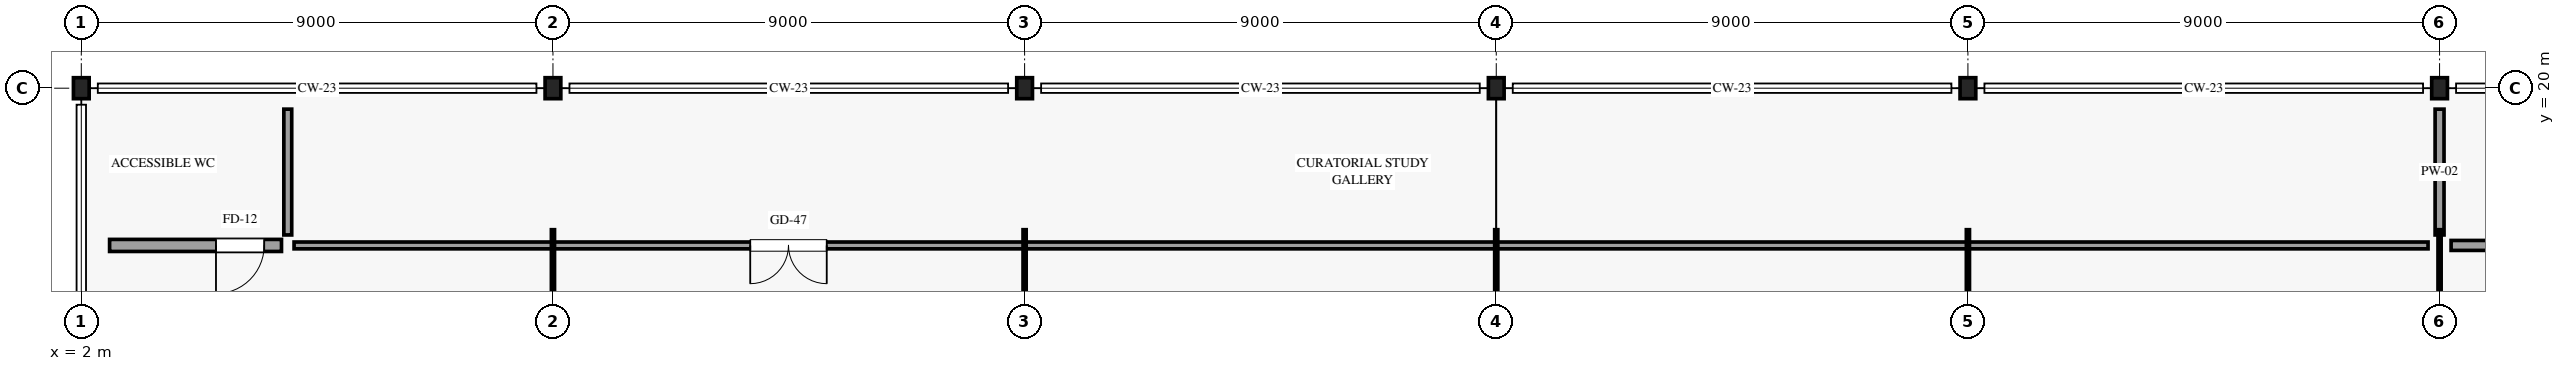
"""IFC4 building model, lengths in metres.
Left out: names, types, materials, properties, quantities, classifications, styles, units other than length and angle.
Written with IfcOpenShell. Run it as: python <this file> out.ifc"""

import sys

from ifc_helpers import new_model, si_unit, direction, frame, frame_2d, origin, origin_2d, place, context, subcontext, project, spatial, rectangle, i_section, extrude, element, fill, save


model = new_model("IFC4")
c1 = context("Model", 3, precision=1e-05, world=origin(), true_north=direction((0.0, 1.0)))
c2 = subcontext(c1, "Body", "Model", "MODEL_VIEW")
j1 = project(units=[si_unit("LENGTHUNIT", "METRE"), si_unit("PLANEANGLEUNIT", "RADIAN")], contexts=[c1])
p1 = place(None, origin())
s1 = spatial("IfcSite", under=j1, at=p1, CompositionType="ELEMENT")
p2 = place(p1, origin())
s2 = spatial("IfcBuilding", under=s1, at=p2, CompositionType="ELEMENT")
p3 = place(p2, frame((0.0, 0.0, 24.0)))
s3 = spatial("IfcBuildingStorey", under=s2, at=p3, CompositionType="ELEMENT", Elevation=24.0)
for number, where, z_axis, x_axis in (
    (1, (2.0, 20.0, 0.0), (0.0, 0.0, 1.0), (1.0, 0.0, 0.0)),
    (2, (11.0, 20.0, 0.0), (0.0, 0.0, 1.0), (1.0, 0.0, 0.0)),
    (3, (20.0, 20.0, 0.0), (0.0, 0.0, 1.0), (1.0, 0.0, 0.0)),
    (4, (29.0, 20.0, 0.0), (0.0, 0.0, 1.0), (1.0, 0.0, 0.0)),
    (5, (38.0, 20.0, 0.0), (0.0, 0.0, 1.0), (1.0, 0.0, 0.0)),
    (6, (47.0, 20.0, 0.0), (0.0, 0.0, 1.0), (1.0, 0.0, 0.0)),
):
    element("IfcColumn", number, at=place(p3, frame(where, z_axis=z_axis, x_axis=x_axis)), inside=s3, PredefinedType="COLUMN", context=c2, shape_type="SweptSolid", body=[
        extrude(i_section(OverallWidth=0.3, OverallDepth=0.4, WebThickness=0.013, FlangeThickness=0.024, FilletRadius=0.027, at=origin_2d()), origin(), (0.0, 0.0, 1.0), 4.8),
    ])
p4 = place(p3, frame((2.54, 17.0, 0.0), z_axis=(0.0, 0.0, 1.0), x_axis=(1.0, 0.0, 0.0)))
e7 = element("IfcWall", 7, at=p4, inside=s3, PredefinedType="PARTITIONING", context=c2, shape_type="SweptSolid", body=[
    extrude(rectangle(XDim=3.28, YDim=0.23, at=frame_2d((1.64, 0.0))), origin(), (0.0, 0.0, 1.0), 2.665),
])
p5 = place(p4, frame((2.95, 0.0, 0.0), z_axis=(0.0, 0.0, 1.0), x_axis=(-1.0, 0.0, 0.0)))
e8 = element("IfcOpeningElement", 8, at=p5, cuts=e7, PredefinedType="OPENING", context=c2, shape_type="SweptSolid", body=[
    extrude(rectangle(XDim=0.92, YDim=2.12, at=frame_2d((0.46, 1.06))), frame((0.0, 0.125, 0.0), z_axis=(0.0, -1.0, 0.0), x_axis=(1.0, 0.0, 0.0)), (0.0, 0.0, 1.0), 0.25),
])
p6 = place(p3, frame((6.06, 17.0, 0.0), z_axis=(0.0, 0.0, 1.0), x_axis=(1.0, 0.0, 0.0)))
e9 = element("IfcWall", 9, at=p6, inside=s3, PredefinedType="PARTITIONING", context=c2, shape_type="SweptSolid", body=[
    extrude(rectangle(XDim=40.72, YDim=0.13, at=frame_2d((20.36, 0.0))), origin(), (0.0, 0.0, 1.0), 2.665),
])
p7 = place(p6, frame((10.164, 0.0, 0.0), z_axis=(0.0, 0.0, 1.0), x_axis=(-1.0, 0.0, 0.0)))
e10 = element("IfcOpeningElement", 10, at=p7, cuts=e9, PredefinedType="OPENING", context=c2, shape_type="SweptSolid", body=[
    extrude(rectangle(XDim=1.46, YDim=2.32, at=frame_2d((0.73, 1.16))), frame((0.0, 0.075, 0.0), z_axis=(0.0, -1.0, 0.0), x_axis=(1.0, 0.0, 0.0)), (0.0, 0.0, 1.0), 0.15),
])
p8 = place(p3, frame((5.94, 17.2, 0.0), z_axis=(0.0, 0.0, 1.0), x_axis=(0.0, 1.0, 0.0)))
e11 = element("IfcWall", 11, at=p8, inside=s3, PredefinedType="PARTITIONING", context=c2, shape_type="SweptSolid", body=[
    extrude(rectangle(XDim=2.4, YDim=0.15, at=frame_2d((1.2, 0.0))), origin(), (0.0, 0.0, 1.0), 2.665),
])
p9 = place(p3, frame((47.0, 17.2, 0.0), z_axis=(0.0, 0.0, 1.0), x_axis=(0.0, 1.0, 0.0)))
e12 = element("IfcWall", 12, at=p9, inside=s3, PredefinedType="PARTITIONING", context=c2, shape_type="SweptSolid", body=[
    extrude(rectangle(XDim=2.4, YDim=0.17, at=frame_2d((1.2, 0.0))), origin(), (0.0, 0.0, 1.0), 2.665),
])
p10 = place(p3, frame((47.22, 17.0, 0.0), z_axis=(0.0, 0.0, 1.0), x_axis=(1.0, 0.0, 0.0)))
e13 = element("IfcWall", 13, at=p10, inside=s3, PredefinedType="PARTITIONING", context=c2, shape_type="SweptSolid", body=[
    extrude(rectangle(XDim=8.56, YDim=0.19, at=frame_2d((4.28, 0.0))), origin(), (0.0, 0.0, 1.0), 2.665),
])
p11 = place(p10, frame((4.82, 0.0, 0.0), z_axis=(0.0, 0.0, 1.0), x_axis=(-1.0, 0.0, 0.0)))
e14 = element("IfcOpeningElement", 14, at=p11, cuts=e13, PredefinedType="OPENING", context=c2, shape_type="SweptSolid", body=[
    extrude(rectangle(XDim=1.04, YDim=2.22, at=frame_2d((0.52, 1.11))), frame((0.0, 0.105, 0.0), z_axis=(0.0, -1.0, 0.0), x_axis=(1.0, 0.0, 0.0)), (0.0, 0.0, 1.0), 0.21),
])
p12 = place(p5, origin())
e15 = element("IfcDoor", 15, at=p12, inside=s3, OperationType="SINGLE_SWING_RIGHT", PredefinedType="DOOR", context=c2, shape_type="SweptSolid", body=[
    extrude(rectangle(XDim=0.92, YDim=2.12, at=frame_2d((0.46, 1.06))), frame((0.0, 0.025, 0.0), z_axis=(0.0, -1.0, 0.0), x_axis=(1.0, 0.0, 0.0)), (0.0, 0.0, 1.0), 0.05),
])
fill(e8, e15)
p13 = place(p7, origin())
e16 = element("IfcDoor", 16, at=p13, inside=s3, OperationType="DOUBLE_DOOR_SINGLE_SWING", PredefinedType="DOOR", context=c2, shape_type="SweptSolid", body=[
    extrude(rectangle(XDim=1.46, YDim=2.32, at=frame_2d((0.73, 1.16))), frame((0.0, 0.025, 0.0), z_axis=(0.0, -1.0, 0.0), x_axis=(1.0, 0.0, 0.0)), (0.0, 0.0, 1.0), 0.05),
])
fill(e10, e16)
save(model, sys.argv[1])
